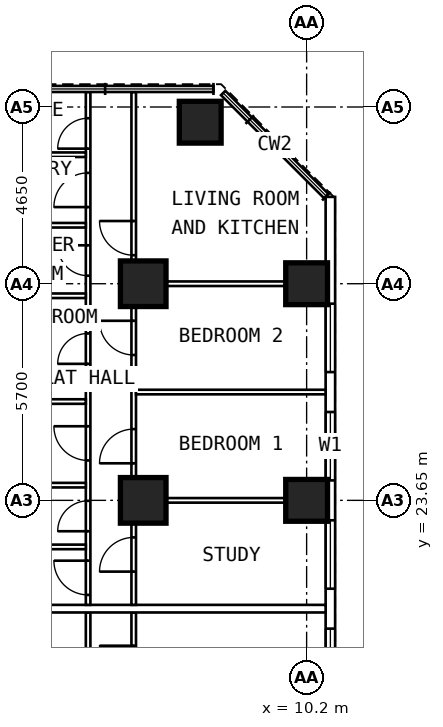
"""IFC4 building model, lengths in metres.
Left out: names, types, materials, properties, quantities, classifications, styles, units other than length and angle.
Written with IfcOpenShell. Run it as: python <this file> out.ifc"""

import sys

from ifc_helpers import new_model, si_unit, direction, frame, frame_2d, origin, origin_2d, place, context, subcontext, project, spatial, rectangle, extrude, element, fill, save


model = new_model("IFC4")
c1 = context("Model", 3, precision=1e-05, world=origin(), true_north=direction((0.0, 1.0)))
c2 = subcontext(c1, "Body", "Model", "MODEL_VIEW")
j1 = project(units=[si_unit("LENGTHUNIT", "METRE"), si_unit("PLANEANGLEUNIT", "RADIAN")], contexts=[c1])
p1 = place(None, origin())
s1 = spatial("IfcSite", under=j1, at=p1, CompositionType="ELEMENT")
p2 = place(p1, origin())
s2 = spatial("IfcBuilding", under=s1, at=p2, CompositionType="ELEMENT")
p3 = place(p2, frame((0.0, 0.0, 28.8)))
s3 = spatial("IfcBuildingStorey", under=s2, at=p3, CompositionType="ELEMENT", Elevation=28.8)
for number, where, z_axis, x_axis in (
    (1, (10.2, 23.65, 0.0), (0.0, 0.0, 1.0), (0.0, 1.0, 0.0)),
    (2, (10.2, 29.35, 0.0), (0.0, 0.0, 1.0), (0.0, 1.0, 0.0)),
    (3, (7.4, 33.6, 0.0), (0.0, 0.0, 1.0), (0.0, 1.0, 0.0)),
):
    element("IfcColumn", number, at=place(p3, frame(where, z_axis=z_axis, x_axis=x_axis)), inside=s3, PredefinedType="COLUMN", context=c2, shape_type="SweptSolid", body=[
        extrude(rectangle(XDim=1.1, YDim=1.1, at=origin_2d()), origin(), (0.0, 0.0, 1.0), 3.6),
    ])
for number, where, z_axis, x_axis in (
    (4, (5.9, 23.65, 0.0), (0.0, 0.0, 1.0), (0.0, 1.0, 0.0)),
    (5, (5.9, 29.35, 0.0), (0.0, 0.0, 1.0), (0.0, 1.0, 0.0)),
):
    element("IfcColumn", number, at=place(p3, frame(where, z_axis=z_axis, x_axis=x_axis)), inside=s3, PredefinedType="COLUMN", context=c2, shape_type="SweptSolid", body=[
        extrude(rectangle(XDim=1.2, YDim=1.2, at=origin_2d()), origin(), (0.0, 0.0, 1.0), 3.6),
    ])
p4 = place(p3, frame((10.825, 6.409, 0.0), z_axis=(0.0, 0.0, 1.0), x_axis=(0.0, 1.0, 0.0)))
e6 = element("IfcWall", 6, at=p4, inside=s3, PredefinedType="SOLIDWALL", context=c2, shape_type="SweptSolid", body=[
    extrude(rectangle(XDim=25.226, YDim=0.25, at=frame_2d((12.613, 0.0))), origin(), (0.0, 0.0, 1.0), 3.3),
])
p5 = place(p4, frame((0.666, 0.0, 0.8)))
e7 = element("IfcOpeningElement", 7, at=p5, cuts=e6, PredefinedType="OPENING", context=c2, shape_type="SweptSolid", body=[
    extrude(rectangle(XDim=1.8, YDim=1.8, at=frame_2d((0.9, 0.9))), frame((0.0, 0.137, 0.0), z_axis=(0.0, -1.0, 0.0), x_axis=(1.0, 0.0, 0.0)), (0.0, 0.0, 1.0), 0.274),
])
p6 = place(p4, frame((3.516, 0.0, 0.8)))
e8 = element("IfcOpeningElement", 8, at=p6, cuts=e6, PredefinedType="OPENING", context=c2, shape_type="SweptSolid", body=[
    extrude(rectangle(XDim=1.8, YDim=1.8, at=frame_2d((0.9, 0.9))), frame((0.0, 0.137, 0.0), z_axis=(0.0, -1.0, 0.0), x_axis=(1.0, 0.0, 0.0)), (0.0, 0.0, 1.0), 0.274),
])
p7 = place(p4, frame((6.366, 0.0, 0.8)))
e9 = element("IfcOpeningElement", 9, at=p7, cuts=e6, PredefinedType="OPENING", context=c2, shape_type="SweptSolid", body=[
    extrude(rectangle(XDim=1.8, YDim=1.8, at=frame_2d((0.9, 0.9))), frame((0.0, 0.137, 0.0), z_axis=(0.0, -1.0, 0.0), x_axis=(1.0, 0.0, 0.0)), (0.0, 0.0, 1.0), 0.274),
])
p8 = place(p4, frame((9.216, 0.0, 0.8)))
e10 = element("IfcOpeningElement", 10, at=p8, cuts=e6, PredefinedType="OPENING", context=c2, shape_type="SweptSolid", body=[
    extrude(rectangle(XDim=1.8, YDim=1.8, at=frame_2d((0.9, 0.9))), frame((0.0, 0.137, 0.0), z_axis=(0.0, -1.0, 0.0), x_axis=(1.0, 0.0, 0.0)), (0.0, 0.0, 1.0), 0.274),
])
p9 = place(p4, frame((12.066, 0.0, 0.8)))
e11 = element("IfcOpeningElement", 11, at=p9, cuts=e6, PredefinedType="OPENING", context=c2, shape_type="SweptSolid", body=[
    extrude(rectangle(XDim=1.8, YDim=1.8, at=frame_2d((0.9, 0.9))), frame((0.0, 0.137, 0.0), z_axis=(0.0, -1.0, 0.0), x_axis=(1.0, 0.0, 0.0)), (0.0, 0.0, 1.0), 0.274),
])
p10 = place(p4, frame((14.916, 0.0, 0.8)))
e12 = element("IfcOpeningElement", 12, at=p10, cuts=e6, PredefinedType="OPENING", context=c2, shape_type="SweptSolid", body=[
    extrude(rectangle(XDim=1.8, YDim=1.8, at=frame_2d((0.9, 0.9))), frame((0.0, 0.137, 0.0), z_axis=(0.0, -1.0, 0.0), x_axis=(1.0, 0.0, 0.0)), (0.0, 0.0, 1.0), 0.274),
])
p11 = place(p4, frame((17.766, 0.0, 0.8)))
e13 = element("IfcOpeningElement", 13, at=p11, cuts=e6, PredefinedType="OPENING", context=c2, shape_type="SweptSolid", body=[
    extrude(rectangle(XDim=1.8, YDim=1.8, at=frame_2d((0.9, 0.9))), frame((0.0, 0.137, 0.0), z_axis=(0.0, -1.0, 0.0), x_axis=(1.0, 0.0, 0.0)), (0.0, 0.0, 1.0), 0.274),
])
p12 = place(p4, frame((20.616, 0.0, 0.8)))
e14 = element("IfcOpeningElement", 14, at=p12, cuts=e6, PredefinedType="OPENING", context=c2, shape_type="SweptSolid", body=[
    extrude(rectangle(XDim=1.8, YDim=1.8, at=frame_2d((0.9, 0.9))), frame((0.0, 0.137, 0.0), z_axis=(0.0, -1.0, 0.0), x_axis=(1.0, 0.0, 0.0)), (0.0, 0.0, 1.0), 0.274),
])
p13 = place(p3, frame((4.45, 10.1, 0.0), z_axis=(0.0, 0.0, 1.0), x_axis=(0.0, 1.0, 0.0)))
e15 = element("IfcWall", 15, at=p13, inside=s3, PredefinedType="PARTITIONING", context=c2, shape_type="SweptSolid", body=[
    extrude(rectangle(XDim=10.6, YDim=0.12, at=frame_2d((5.3, 0.0))), origin(), (0.0, 0.0, 1.0), 3.3),
])
p14 = place(p13, frame((0.56, 0.0, 0.0)))
e16 = element("IfcOpeningElement", 16, at=p14, cuts=e15, PredefinedType="OPENING", context=c2, shape_type="SweptSolid", body=[
    extrude(rectangle(XDim=0.9, YDim=2.1, at=frame_2d((0.45, 1.05))), frame((0.0, 0.072, 0.0), z_axis=(0.0, -1.0, 0.0), x_axis=(1.0, 0.0, 0.0)), (0.0, 0.0, 1.0), 0.144),
])
p15 = place(p13, frame((3.385, 0.0, 0.0)))
e17 = element("IfcOpeningElement", 17, at=p15, cuts=e15, PredefinedType="OPENING", context=c2, shape_type="SweptSolid", body=[
    extrude(rectangle(XDim=0.8, YDim=2.1, at=frame_2d((0.4, 1.05))), frame((0.0, 0.072, 0.0), z_axis=(0.0, -1.0, 0.0), x_axis=(1.0, 0.0, 0.0)), (0.0, 0.0, 1.0), 0.144),
])
p16 = place(p13, frame((6.1, 0.0, 0.0)))
e18 = element("IfcOpeningElement", 18, at=p16, cuts=e15, PredefinedType="OPENING", context=c2, shape_type="SweptSolid", body=[
    extrude(rectangle(XDim=0.9, YDim=2.1, at=frame_2d((0.45, 1.05))), frame((0.0, 0.072, 0.0), z_axis=(0.0, -1.0, 0.0), x_axis=(1.0, 0.0, 0.0)), (0.0, 0.0, 1.0), 0.144),
])
p17 = place(p13, frame((8.775, 0.0, 0.0)))
e19 = element("IfcOpeningElement", 19, at=p17, cuts=e15, PredefinedType="OPENING", context=c2, shape_type="SweptSolid", body=[
    extrude(rectangle(XDim=0.8, YDim=2.1, at=frame_2d((0.4, 1.05))), frame((0.0, 0.072, 0.0), z_axis=(0.0, -1.0, 0.0), x_axis=(1.0, 0.0, 0.0)), (0.0, 0.0, 1.0), 0.144),
])
p18 = place(p3, frame((5.65, 9.6, 0.0), z_axis=(0.0, 0.0, 1.0), x_axis=(0.0, 1.0, 0.0)))
e20 = element("IfcWall", 20, at=p18, inside=s3, PredefinedType="PARTITIONING", context=c2, shape_type="SweptSolid", body=[
    extrude(rectangle(XDim=11.1, YDim=0.12, at=frame_2d((5.55, 0.0))), origin(), (0.0, 0.0, 1.0), 3.3),
])
p19 = place(p18, frame((1.0, 0.0, 0.0)))
e21 = element("IfcOpeningElement", 21, at=p19, cuts=e20, PredefinedType="OPENING", context=c2, shape_type="SweptSolid", body=[
    extrude(rectangle(XDim=0.9, YDim=2.1, at=frame_2d((0.45, 1.05))), frame((0.0, 0.072, 0.0), z_axis=(0.0, -1.0, 0.0), x_axis=(1.0, 0.0, 0.0)), (0.0, 0.0, 1.0), 0.144),
])
p20 = place(p18, frame((3.625, 0.0, 0.0)))
e22 = element("IfcOpeningElement", 22, at=p20, cuts=e20, PredefinedType="OPENING", context=c2, shape_type="SweptSolid", body=[
    extrude(rectangle(XDim=0.9, YDim=2.1, at=frame_2d((0.45, 1.05))), frame((0.0, 0.072, 0.0), z_axis=(0.0, -1.0, 0.0), x_axis=(1.0, 0.0, 0.0)), (0.0, 0.0, 1.0), 0.144),
])
p21 = place(p18, frame((6.475, 0.0, 0.0)))
e23 = element("IfcOpeningElement", 23, at=p21, cuts=e20, PredefinedType="OPENING", context=c2, shape_type="SweptSolid", body=[
    extrude(rectangle(XDim=0.9, YDim=2.1, at=frame_2d((0.45, 1.05))), frame((0.0, 0.072, 0.0), z_axis=(0.0, -1.0, 0.0), x_axis=(1.0, 0.0, 0.0)), (0.0, 0.0, 1.0), 0.144),
])
p22 = place(p18, frame((9.325, 0.0, 0.0)))
e24 = element("IfcOpeningElement", 24, at=p22, cuts=e20, PredefinedType="OPENING", context=c2, shape_type="SweptSolid", body=[
    extrude(rectangle(XDim=0.9, YDim=2.1, at=frame_2d((0.45, 1.05))), frame((0.0, 0.072, 0.0), z_axis=(0.0, -1.0, 0.0), x_axis=(1.0, 0.0, 0.0)), (0.0, 0.0, 1.0), 0.144),
])
p23 = place(p3, frame((4.45, 20.9, 0.0), z_axis=(0.0, 0.0, 1.0), x_axis=(0.0, 1.0, 0.0)))
e25 = element("IfcWall", 25, at=p23, inside=s3, PredefinedType="PARTITIONING", context=c2, shape_type="SweptSolid", body=[
    extrude(rectangle(XDim=13.495, YDim=0.12, at=frame_2d((6.748, 0.0))), origin(), (0.0, 0.0, 1.0), 3.3),
])
p24 = place(p23, frame((0.262, 0.0, 0.0)))
e26 = element("IfcOpeningElement", 26, at=p24, cuts=e25, PredefinedType="OPENING", context=c2, shape_type="SweptSolid", body=[
    extrude(rectangle(XDim=0.9, YDim=2.1, at=frame_2d((0.45, 1.05))), frame((0.0, 0.072, 0.0), z_axis=(0.0, -1.0, 0.0), x_axis=(1.0, 0.0, 0.0)), (0.0, 0.0, 1.0), 0.144),
])
p25 = place(p23, frame((1.938, 0.0, 0.0)))
e27 = element("IfcOpeningElement", 27, at=p25, cuts=e25, PredefinedType="OPENING", context=c2, shape_type="SweptSolid", body=[
    extrude(rectangle(XDim=0.8, YDim=2.1, at=frame_2d((0.4, 1.05))), frame((0.0, 0.072, 0.0), z_axis=(0.0, -1.0, 0.0), x_axis=(1.0, 0.0, 0.0)), (0.0, 0.0, 1.0), 0.144),
])
p26 = place(p23, frame((3.8, 0.0, 0.0)))
e28 = element("IfcOpeningElement", 28, at=p26, cuts=e25, PredefinedType="OPENING", context=c2, shape_type="SweptSolid", body=[
    extrude(rectangle(XDim=0.9, YDim=2.1, at=frame_2d((0.45, 1.05))), frame((0.0, 0.072, 0.0), z_axis=(0.0, -1.0, 0.0), x_axis=(1.0, 0.0, 0.0)), (0.0, 0.0, 1.0), 0.144),
])
p27 = place(p23, frame((6.342, 0.0, 0.0)))
e29 = element("IfcOpeningElement", 29, at=p27, cuts=e25, PredefinedType="OPENING", context=c2, shape_type="SweptSolid", body=[
    extrude(rectangle(XDim=0.8, YDim=2.1, at=frame_2d((0.4, 1.05))), frame((0.0, 0.072, 0.0), z_axis=(0.0, -1.0, 0.0), x_axis=(1.0, 0.0, 0.0)), (0.0, 0.0, 1.0), 0.144),
])
p28 = place(p23, frame((8.661, 0.0, 0.0)))
e30 = element("IfcOpeningElement", 30, at=p28, cuts=e25, PredefinedType="OPENING", context=c2, shape_type="SweptSolid", body=[
    extrude(rectangle(XDim=0.8, YDim=2.1, at=frame_2d((0.4, 1.05))), frame((0.0, 0.072, 0.0), z_axis=(0.0, -1.0, 0.0), x_axis=(1.0, 0.0, 0.0)), (0.0, 0.0, 1.0), 0.144),
])
p29 = place(p23, frame((10.467, 0.0, 0.0)))
e31 = element("IfcOpeningElement", 31, at=p29, cuts=e25, PredefinedType="OPENING", context=c2, shape_type="SweptSolid", body=[
    extrude(rectangle(XDim=0.9, YDim=2.1, at=frame_2d((0.45, 1.05))), frame((0.0, 0.072, 0.0), z_axis=(0.0, -1.0, 0.0), x_axis=(1.0, 0.0, 0.0)), (0.0, 0.0, 1.0), 0.144),
])
p30 = place(p23, frame((12.004, 0.0, 0.0)))
e32 = element("IfcOpeningElement", 32, at=p30, cuts=e25, PredefinedType="OPENING", context=c2, shape_type="SweptSolid", body=[
    extrude(rectangle(XDim=0.8, YDim=2.1, at=frame_2d((0.4, 1.05))), frame((0.0, 0.072, 0.0), z_axis=(0.0, -1.0, 0.0), x_axis=(1.0, 0.0, 0.0)), (0.0, 0.0, 1.0), 0.144),
])
p31 = place(p3, frame((5.65, 20.9, 0.0), z_axis=(0.0, 0.0, 1.0), x_axis=(0.0, 1.0, 0.0)))
e33 = element("IfcWall", 33, at=p31, inside=s3, PredefinedType="PARTITIONING", context=c2, shape_type="SweptSolid", body=[
    extrude(rectangle(XDim=13.495, YDim=0.12, at=frame_2d((6.748, 0.0))), origin(), (0.0, 0.0, 1.0), 3.3),
])
p32 = place(p31, frame((0.875, 0.0, 0.0)))
e34 = element("IfcOpeningElement", 34, at=p32, cuts=e33, PredefinedType="OPENING", context=c2, shape_type="SweptSolid", body=[
    extrude(rectangle(XDim=0.9, YDim=2.1, at=frame_2d((0.45, 1.05))), frame((0.0, 0.072, 0.0), z_axis=(0.0, -1.0, 0.0), x_axis=(1.0, 0.0, 0.0)), (0.0, 0.0, 1.0), 0.144),
])
p33 = place(p31, frame((3.725, 0.0, 0.0)))
e35 = element("IfcOpeningElement", 35, at=p33, cuts=e33, PredefinedType="OPENING", context=c2, shape_type="SweptSolid", body=[
    extrude(rectangle(XDim=0.9, YDim=2.1, at=frame_2d((0.45, 1.05))), frame((0.0, 0.072, 0.0), z_axis=(0.0, -1.0, 0.0), x_axis=(1.0, 0.0, 0.0)), (0.0, 0.0, 1.0), 0.144),
])
p34 = place(p31, frame((6.575, 0.0, 0.0)))
e36 = element("IfcOpeningElement", 36, at=p34, cuts=e33, PredefinedType="OPENING", context=c2, shape_type="SweptSolid", body=[
    extrude(rectangle(XDim=0.9, YDim=2.1, at=frame_2d((0.45, 1.05))), frame((0.0, 0.072, 0.0), z_axis=(0.0, -1.0, 0.0), x_axis=(1.0, 0.0, 0.0)), (0.0, 0.0, 1.0), 0.144),
])
p35 = place(p31, frame((9.2, 0.0, 0.0)))
e37 = element("IfcOpeningElement", 37, at=p35, cuts=e33, PredefinedType="OPENING", context=c2, shape_type="SweptSolid", body=[
    extrude(rectangle(XDim=0.9, YDim=2.1, at=frame_2d((0.45, 1.05))), frame((0.0, 0.072, 0.0), z_axis=(0.0, -1.0, 0.0), x_axis=(1.0, 0.0, 0.0)), (0.0, 0.0, 1.0), 0.144),
])
for number, where, z_axis, x_axis in (
    (38, (5.71, 23.65, 0.0), (0.0, 0.0, 1.0), (1.0, 0.0, 0.0)),
    (39, (5.71, 26.5, 0.0), (0.0, 0.0, 1.0), (1.0, 0.0, 0.0)),
):
    element("IfcWall", number, at=place(p3, frame(where, z_axis=z_axis, x_axis=x_axis)), inside=s3, PredefinedType="PARTITIONING", context=c2, shape_type="SweptSolid", body=[
        extrude(rectangle(XDim=4.99, YDim=0.12, at=frame_2d((2.495, 0.0))), origin(), (0.0, 0.0, 1.0), 3.3),
    ])
p36 = place(p3, frame((5.71, 29.35, 0.0), z_axis=(0.0, 0.0, 1.0), x_axis=(1.0, 0.0, 0.0)))
e40 = element("IfcWall", 40, at=p36, inside=s3, PredefinedType="PARTITIONING", context=c2, shape_type="SweptSolid", body=[
    extrude(rectangle(XDim=4.99, YDim=0.12, at=frame_2d((2.495, 0.0))), origin(), (0.0, 0.0, 1.0), 2.3),
])
for number, where, z_axis, x_axis in (
    (41, (2.1, 22.425, 0.0), (0.0, 0.0, 1.0), (1.0, 0.0, 0.0)),
    (42, (2.1, 24.05, 0.0), (0.0, 0.0, 1.0), (1.0, 0.0, 0.0)),
    (43, (2.1, 26.25, 0.0), (0.0, 0.0, 1.0), (1.0, 0.0, 0.0)),
):
    element("IfcWall", number, at=place(p3, frame(where, z_axis=z_axis, x_axis=x_axis)), inside=s3, PredefinedType="PARTITIONING", context=c2, shape_type="SweptSolid", body=[
        extrude(rectangle(XDim=2.29, YDim=0.12, at=frame_2d((1.145, 0.0))), origin(), (0.0, 0.0, 1.0), 3.3),
    ])
p37 = place(p3, frame((2.1, 29.033, 0.0), z_axis=(0.0, 0.0, 1.0), x_axis=(1.0, 0.0, 0.0)))
e44 = element("IfcWall", 44, at=p37, inside=s3, PredefinedType="PARTITIONING", context=c2, shape_type="SweptSolid", body=[
    extrude(rectangle(XDim=2.29, YDim=0.12, at=frame_2d((1.145, 0.0))), origin(), (0.0, 0.0, 1.0), 2.3),
])
for number, where, z_axis, x_axis in (
    (45, (2.1, 30.889, 0.0), (0.0, 0.0, 1.0), (1.0, 0.0, 0.0)),
    (46, (2.1, 32.744, 0.0), (0.0, 0.0, 1.0), (1.0, 0.0, 0.0)),
):
    element("IfcWall", number, at=place(p3, frame(where, z_axis=z_axis, x_axis=x_axis)), inside=s3, PredefinedType="PARTITIONING", context=c2, shape_type="SweptSolid", body=[
        extrude(rectangle(XDim=2.29, YDim=0.12, at=frame_2d((1.145, 0.0))), origin(), (0.0, 0.0, 1.0), 3.3),
    ])
p38 = place(p3, frame((2.1, 20.8, 0.0), z_axis=(0.0, 0.0, 1.0), x_axis=(1.0, 0.0, 0.0)))
e47 = element("IfcWall", 47, at=p38, inside=s3, PredefinedType="PARTITIONING", context=c2, shape_type="SweptSolid", body=[
    extrude(rectangle(XDim=8.6, YDim=0.2, at=frame_2d((4.3, 0.0))), origin(), (0.0, 0.0, 1.0), 3.3),
])
p39 = place(p9, origin())
e48 = element("IfcWindow", 48, at=p39, inside=s3, PartitioningType="SINGLE_PANEL", PredefinedType="WINDOW", context=c2, shape_type="SweptSolid", body=[
    extrude(rectangle(XDim=1.8, YDim=1.8, at=frame_2d((0.9, 0.9))), frame((0.0, 0.03, 0.0), z_axis=(0.0, -1.0, 0.0), x_axis=(1.0, 0.0, 0.0)), (0.0, 0.0, 1.0), 0.06),
])
fill(e11, e48)
p40 = place(p10, origin())
e49 = element("IfcWindow", 49, at=p40, inside=s3, PartitioningType="SINGLE_PANEL", PredefinedType="WINDOW", context=c2, shape_type="SweptSolid", body=[
    extrude(rectangle(XDim=1.8, YDim=1.8, at=frame_2d((0.9, 0.9))), frame((0.0, 0.03, 0.0), z_axis=(0.0, -1.0, 0.0), x_axis=(1.0, 0.0, 0.0)), (0.0, 0.0, 1.0), 0.06),
])
fill(e12, e49)
p41 = place(p11, origin())
e50 = element("IfcWindow", 50, at=p41, inside=s3, PartitioningType="SINGLE_PANEL", PredefinedType="WINDOW", context=c2, shape_type="SweptSolid", body=[
    extrude(rectangle(XDim=1.8, YDim=1.8, at=frame_2d((0.9, 0.9))), frame((0.0, 0.03, 0.0), z_axis=(0.0, -1.0, 0.0), x_axis=(1.0, 0.0, 0.0)), (0.0, 0.0, 1.0), 0.06),
])
fill(e13, e50)
p42 = place(p12, origin())
e51 = element("IfcWindow", 51, at=p42, inside=s3, PartitioningType="SINGLE_PANEL", PredefinedType="WINDOW", context=c2, shape_type="SweptSolid", body=[
    extrude(rectangle(XDim=1.8, YDim=1.8, at=frame_2d((0.9, 0.9))), frame((0.0, 0.03, 0.0), z_axis=(0.0, -1.0, 0.0), x_axis=(1.0, 0.0, 0.0)), (0.0, 0.0, 1.0), 0.06),
])
fill(e14, e51)
p43 = place(p22, origin())
e52 = element("IfcDoor", 52, at=p43, inside=s3, OperationType="SINGLE_SWING_RIGHT", PredefinedType="DOOR", context=c2, shape_type="SweptSolid", body=[
    extrude(rectangle(XDim=0.9, YDim=2.1, at=frame_2d((0.45, 1.05))), frame((0.0, 0.025, 0.0), z_axis=(0.0, -1.0, 0.0), x_axis=(1.0, 0.0, 0.0)), (0.0, 0.0, 1.0), 0.05),
])
fill(e24, e52)
p44 = place(p32, origin())
e53 = element("IfcDoor", 53, at=p44, inside=s3, OperationType="SINGLE_SWING_LEFT", PredefinedType="DOOR", context=c2, shape_type="SweptSolid", body=[
    extrude(rectangle(XDim=0.9, YDim=2.1, at=frame_2d((0.45, 1.05))), frame((0.0, 0.025, 0.0), z_axis=(0.0, -1.0, 0.0), x_axis=(1.0, 0.0, 0.0)), (0.0, 0.0, 1.0), 0.05),
])
fill(e34, e53)
p45 = place(p33, origin())
e54 = element("IfcDoor", 54, at=p45, inside=s3, OperationType="SINGLE_SWING_LEFT", PredefinedType="DOOR", context=c2, shape_type="SweptSolid", body=[
    extrude(rectangle(XDim=0.9, YDim=2.1, at=frame_2d((0.45, 1.05))), frame((0.0, 0.025, 0.0), z_axis=(0.0, -1.0, 0.0), x_axis=(1.0, 0.0, 0.0)), (0.0, 0.0, 1.0), 0.05),
])
fill(e35, e54)
p46 = place(p34, origin())
e55 = element("IfcDoor", 55, at=p46, inside=s3, OperationType="SINGLE_SWING_RIGHT", PredefinedType="DOOR", context=c2, shape_type="SweptSolid", body=[
    extrude(rectangle(XDim=0.9, YDim=2.1, at=frame_2d((0.45, 1.05))), frame((0.0, 0.025, 0.0), z_axis=(0.0, -1.0, 0.0), x_axis=(1.0, 0.0, 0.0)), (0.0, 0.0, 1.0), 0.05),
])
fill(e36, e55)
p47 = place(p35, origin())
e56 = element("IfcDoor", 56, at=p47, inside=s3, OperationType="SINGLE_SWING_RIGHT", PredefinedType="DOOR", context=c2, shape_type="SweptSolid", body=[
    extrude(rectangle(XDim=0.9, YDim=2.1, at=frame_2d((0.45, 1.05))), frame((0.0, 0.025, 0.0), z_axis=(0.0, -1.0, 0.0), x_axis=(1.0, 0.0, 0.0)), (0.0, 0.0, 1.0), 0.05),
])
fill(e37, e56)
p48 = place(p24, origin())
e57 = element("IfcDoor", 57, at=p48, inside=s3, OperationType="SINGLE_SWING_RIGHT", PredefinedType="DOOR", context=c2, shape_type="SweptSolid", body=[
    extrude(rectangle(XDim=0.9, YDim=2.1, at=frame_2d((0.45, 1.05))), frame((0.0, 0.025, 0.0), z_axis=(0.0, -1.0, 0.0), x_axis=(1.0, 0.0, 0.0)), (0.0, 0.0, 1.0), 0.05),
])
fill(e26, e57)
p49 = place(p25, origin())
e58 = element("IfcDoor", 58, at=p49, inside=s3, OperationType="SINGLE_SWING_LEFT", PredefinedType="DOOR", context=c2, shape_type="SweptSolid", body=[
    extrude(rectangle(XDim=0.8, YDim=2.1, at=frame_2d((0.4, 1.05))), frame((0.0, 0.025, 0.0), z_axis=(0.0, -1.0, 0.0), x_axis=(1.0, 0.0, 0.0)), (0.0, 0.0, 1.0), 0.05),
])
fill(e27, e58)
p50 = place(p26, origin())
e59 = element("IfcDoor", 59, at=p50, inside=s3, OperationType="SINGLE_SWING_RIGHT", PredefinedType="DOOR", context=c2, shape_type="SweptSolid", body=[
    extrude(rectangle(XDim=0.9, YDim=2.1, at=frame_2d((0.45, 1.05))), frame((0.0, 0.025, 0.0), z_axis=(0.0, -1.0, 0.0), x_axis=(1.0, 0.0, 0.0)), (0.0, 0.0, 1.0), 0.05),
])
fill(e28, e59)
p51 = place(p27, origin())
e60 = element("IfcDoor", 60, at=p51, inside=s3, OperationType="SINGLE_SWING_LEFT", PredefinedType="DOOR", context=c2, shape_type="SweptSolid", body=[
    extrude(rectangle(XDim=0.8, YDim=2.1, at=frame_2d((0.4, 1.05))), frame((0.0, 0.025, 0.0), z_axis=(0.0, -1.0, 0.0), x_axis=(1.0, 0.0, 0.0)), (0.0, 0.0, 1.0), 0.05),
])
fill(e29, e60)
p52 = place(p28, origin())
e61 = element("IfcDoor", 61, at=p52, inside=s3, OperationType="SINGLE_SWING_RIGHT", PredefinedType="DOOR", context=c2, shape_type="SweptSolid", body=[
    extrude(rectangle(XDim=0.8, YDim=2.1, at=frame_2d((0.4, 1.05))), frame((0.0, 0.025, 0.0), z_axis=(0.0, -1.0, 0.0), x_axis=(1.0, 0.0, 0.0)), (0.0, 0.0, 1.0), 0.05),
])
fill(e30, e61)
p53 = place(p29, origin())
e62 = element("IfcDoor", 62, at=p53, inside=s3, OperationType="SINGLE_SWING_LEFT", PredefinedType="DOOR", context=c2, shape_type="SweptSolid", body=[
    extrude(rectangle(XDim=0.9, YDim=2.1, at=frame_2d((0.45, 1.05))), frame((0.0, 0.025, 0.0), z_axis=(0.0, -1.0, 0.0), x_axis=(1.0, 0.0, 0.0)), (0.0, 0.0, 1.0), 0.05),
])
fill(e31, e62)
p54 = place(p30, origin())
e63 = element("IfcDoor", 63, at=p54, inside=s3, OperationType="SINGLE_SWING_LEFT", PredefinedType="DOOR", context=c2, shape_type="SweptSolid", body=[
    extrude(rectangle(XDim=0.8, YDim=2.1, at=frame_2d((0.4, 1.05))), frame((0.0, 0.025, 0.0), z_axis=(0.0, -1.0, 0.0), x_axis=(1.0, 0.0, 0.0)), (0.0, 0.0, 1.0), 0.05),
])
fill(e32, e63)
save(model, sys.argv[1])
